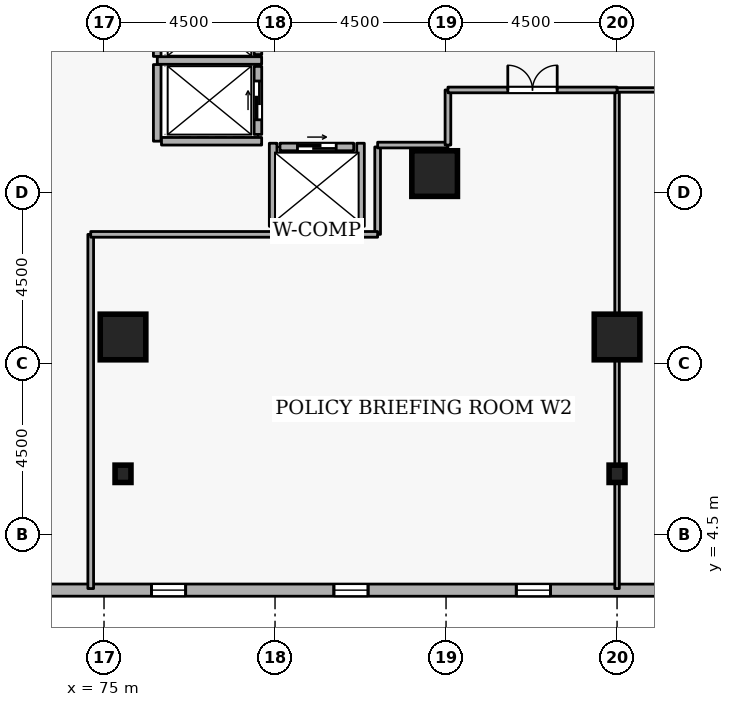
"""IFC4 building model, lengths in metres.
Left out: names, types, materials, properties, quantities, classifications, styles, units other than length and angle.
Written with IfcOpenShell. Run it as: python <this file> out.ifc"""

import sys

from ifc_helpers import new_model, si_unit, direction, frame, frame_2d, origin, origin_2d, place, context, subcontext, project, spatial, rectangle, i_section, extrude, element, fill, save


model = new_model("IFC4")
c1 = context("Model", 3, precision=1e-05, world=origin(), true_north=direction((0.0, 1.0)))
c2 = subcontext(c1, "Body", "Model", "MODEL_VIEW")
j1 = project(units=[si_unit("LENGTHUNIT", "METRE"), si_unit("PLANEANGLEUNIT", "RADIAN")], contexts=[c1])
p1 = place(None, origin())
s1 = spatial("IfcSite", under=j1, at=p1, CompositionType="ELEMENT")
p2 = place(p1, origin())
s2 = spatial("IfcBuilding", under=s1, at=p2, CompositionType="ELEMENT")
p3 = place(p2, frame((0.0, 0.0, 98.1)))
s3 = spatial("IfcBuildingStorey", under=s2, at=p3, CompositionType="ELEMENT", Elevation=98.1)
for number, where, z_axis, x_axis in (
    (1, (88.5, 9.7, 0.0), (0.0, 0.0, 1.0), (1.0, 0.0, 0.0)),
    (2, (75.5, 9.7, 0.0), (0.0, 0.0, 1.0), (1.0, 0.0, 0.0)),
    (3, (83.7, 14.0, 0.0), (0.0, 0.0, 1.0), (1.0, 0.0, 0.0)),
):
    element("IfcColumn", number, at=place(p3, frame(where, z_axis=z_axis, x_axis=x_axis)), inside=s3, PredefinedType="COLUMN", context=c2, shape_type="SweptSolid", body=[
        extrude(rectangle(XDim=1.2, YDim=1.2, at=origin_2d()), origin(), (0.0, 0.0, 1.0), 3.6),
    ])
for number, where, z_axis, x_axis in (
    (4, (88.5, 6.1, 0.0), (0.0, 0.0, 1.0), (1.0, 0.0, 0.0)),
    (5, (75.5, 6.1, 0.0), (0.0, 0.0, 1.0), (1.0, 0.0, 0.0)),
):
    element("IfcColumn", number, at=place(p3, frame(where, z_axis=z_axis, x_axis=x_axis)), inside=s3, PredefinedType="COLUMN", context=c2, shape_type="SweptSolid", body=[
        extrude(i_section(OverallWidth=0.418, OverallDepth=0.456, WebThickness=0.042, FlangeThickness=0.067, FilletRadius=0.015, at=origin_2d()), origin(), (0.0, 0.0, 1.0), 3.6),
    ])
p4 = place(p3, frame((68.748, 3.041, 0.0), z_axis=(0.0, 0.0, 1.0), x_axis=(0.999999989352, -0.000145929605, 0.0)))
e6 = element("IfcWall", 6, at=p4, inside=s3, PredefinedType="STANDARD", context=c2, shape_type="SweptSolid", body=[
    extrude(rectangle(XDim=35.133, YDim=0.32, at=frame_2d((17.566, 0.0))), origin(), (0.0, 0.0, 1.0), 2.7),
])
p5 = place(p4, frame((2.7, 0.0, 0.72)))
e7 = element("IfcOpeningElement", 7, at=p5, cuts=e6, PredefinedType="OPENING", context=c2, shape_type="SweptSolid", body=[
    extrude(rectangle(XDim=0.9, YDim=1.75, at=frame_2d((0.45, 0.875))), frame((0.0, 0.17, 0.0), z_axis=(0.0, -1.0, 0.0), x_axis=(1.0, 0.0, 0.0)), (0.0, 0.0, 1.0), 0.34),
])
p6 = place(p4, frame((7.5, 0.0, 0.72)))
e8 = element("IfcOpeningElement", 8, at=p6, cuts=e6, PredefinedType="OPENING", context=c2, shape_type="SweptSolid", body=[
    extrude(rectangle(XDim=0.9, YDim=1.75, at=frame_2d((0.45, 0.875))), frame((0.0, 0.17, 0.0), z_axis=(0.0, -1.0, 0.0), x_axis=(1.0, 0.0, 0.0)), (0.0, 0.0, 1.0), 0.34),
])
p7 = place(p4, frame((12.3, 0.0, 0.72)))
e9 = element("IfcOpeningElement", 9, at=p7, cuts=e6, PredefinedType="OPENING", context=c2, shape_type="SweptSolid", body=[
    extrude(rectangle(XDim=0.9, YDim=1.75, at=frame_2d((0.45, 0.875))), frame((0.0, 0.17, 0.0), z_axis=(0.0, -1.0, 0.0), x_axis=(1.0, 0.0, 0.0)), (0.0, 0.0, 1.0), 0.34),
])
p8 = place(p4, frame((17.1, 0.0, 0.72)))
e10 = element("IfcOpeningElement", 10, at=p8, cuts=e6, PredefinedType="OPENING", context=c2, shape_type="SweptSolid", body=[
    extrude(rectangle(XDim=0.9, YDim=1.75, at=frame_2d((0.45, 0.875))), frame((0.0, 0.17, 0.0), z_axis=(0.0, -1.0, 0.0), x_axis=(1.0, 0.0, 0.0)), (0.0, 0.0, 1.0), 0.34),
])
p9 = place(p4, frame((21.9, 0.0, 0.72)))
e11 = element("IfcOpeningElement", 11, at=p9, cuts=e6, PredefinedType="OPENING", context=c2, shape_type="SweptSolid", body=[
    extrude(rectangle(XDim=0.9, YDim=1.75, at=frame_2d((0.45, 0.875))), frame((0.0, 0.17, 0.0), z_axis=(0.0, -1.0, 0.0), x_axis=(1.0, 0.0, 0.0)), (0.0, 0.0, 1.0), 0.34),
])
p10 = place(p4, frame((26.7, 0.0, 0.72)))
e12 = element("IfcOpeningElement", 12, at=p10, cuts=e6, PredefinedType="OPENING", context=c2, shape_type="SweptSolid", body=[
    extrude(rectangle(XDim=0.9, YDim=1.75, at=frame_2d((0.45, 0.875))), frame((0.0, 0.17, 0.0), z_axis=(0.0, -1.0, 0.0), x_axis=(1.0, 0.0, 0.0)), (0.0, 0.0, 1.0), 0.34),
])
p11 = place(p4, frame((31.5, 0.0, 0.72)))
e13 = element("IfcOpeningElement", 13, at=p11, cuts=e6, PredefinedType="OPENING", context=c2, shape_type="SweptSolid", body=[
    extrude(rectangle(XDim=0.9, YDim=1.75, at=frame_2d((0.45, 0.875))), frame((0.0, 0.17, 0.0), z_axis=(0.0, -1.0, 0.0), x_axis=(1.0, 0.0, 0.0)), (0.0, 0.0, 1.0), 0.34),
])
p12 = place(p3, frame((79.05, 17.13, 0.0), z_axis=(0.0, 0.0, 1.0), x_axis=(0.0, 1.0, 0.0)))
e14 = element("IfcWall", 14, at=p12, inside=s3, PredefinedType="STANDARD", context=c2, shape_type="SweptSolid", body=[
    extrude(rectangle(XDim=1.74, YDim=0.2, at=frame_2d((0.87, 0.0))), origin(), (0.0, 0.0, 1.0), 3.3),
])
p13 = place(p12, frame((0.36, 0.0, 0.0)))
e15 = element("IfcOpeningElement", 15, at=p13, cuts=e14, PredefinedType="OPENING", context=c2, shape_type="SweptSolid", body=[
    extrude(rectangle(XDim=1.02, YDim=2.06, at=frame_2d((0.51, 1.03))), frame((0.0, 0.11, 0.0), z_axis=(0.0, -1.0, 0.0), x_axis=(1.0, 0.0, 0.0)), (0.0, 0.0, 1.0), 0.22),
])
p14 = place(p3, frame((79.05, 15.03, 0.0), z_axis=(0.0, 0.0, 1.0), x_axis=(0.0, 1.0, 0.0)))
e16 = element("IfcWall", 16, at=p14, inside=s3, PredefinedType="STANDARD", context=c2, shape_type="SweptSolid", body=[
    extrude(rectangle(XDim=1.79, YDim=0.2, at=frame_2d((0.895, 0.0))), origin(), (0.0, 0.0, 1.0), 3.3),
])
p15 = place(p14, frame((0.385, 0.0, 0.0)))
e17 = element("IfcOpeningElement", 17, at=p15, cuts=e16, PredefinedType="OPENING", context=c2, shape_type="SweptSolid", body=[
    extrude(rectangle(XDim=1.02, YDim=2.06, at=frame_2d((0.51, 1.03))), frame((0.0, 0.11, 0.0), z_axis=(0.0, -1.0, 0.0), x_axis=(1.0, 0.0, 0.0)), (0.0, 0.0, 1.0), 0.22),
])
p16 = place(p3, frame((79.63, 14.7, 0.0), z_axis=(0.0, 0.0, 1.0), x_axis=(1.0, 0.0, 0.0)))
e18 = element("IfcWall", 18, at=p16, inside=s3, PredefinedType="STANDARD", context=c2, shape_type="SweptSolid", body=[
    extrude(rectangle(XDim=1.94, YDim=0.2, at=frame_2d((0.97, 0.0))), origin(), (0.0, 0.0, 1.0), 3.3),
])
p17 = place(p16, frame((0.46, 0.0, 0.0)))
e19 = element("IfcOpeningElement", 19, at=p17, cuts=e18, PredefinedType="OPENING", context=c2, shape_type="SweptSolid", body=[
    extrude(rectangle(XDim=1.02, YDim=2.06, at=frame_2d((0.51, 1.03))), frame((0.0, 0.11, 0.0), z_axis=(0.0, -1.0, 0.0), x_axis=(1.0, 0.0, 0.0)), (0.0, 0.0, 1.0), 0.22),
])
p18 = place(p3, frame((76.402, 16.975, 0.0), z_axis=(0.0, 0.0, 1.0), x_axis=(1.0, 0.0, 0.0)))
e20 = element("IfcWall", 20, at=p18, inside=s3, PredefinedType="STANDARD", context=c2, shape_type="SweptSolid", body=[
    extrude(rectangle(XDim=2.746, YDim=0.2, at=frame_2d((1.373, 0.0))), origin(), (0.0, 0.0, 1.0), 3.3),
])
p19 = place(p3, frame((76.4, 14.852, 0.0), z_axis=(0.0, 0.0, 1.0), x_axis=(0.0, 1.0, 0.0)))
e21 = element("IfcWall", 21, at=p19, inside=s3, PredefinedType="STANDARD", context=c2, shape_type="SweptSolid", body=[
    extrude(rectangle(XDim=2.016, YDim=0.2, at=frame_2d((1.008, 0.0))), origin(), (0.0, 0.0, 1.0), 3.3),
])
p20 = place(p3, frame((76.4, 17.082, 0.0), z_axis=(0.0, 0.0, 1.0), x_axis=(0.0, 1.0, 0.0)))
e22 = element("IfcWall", 22, at=p20, inside=s3, PredefinedType="STANDARD", context=c2, shape_type="SweptSolid", body=[
    extrude(rectangle(XDim=1.856, YDim=0.2, at=frame_2d((0.928, 0.0))), origin(), (0.0, 0.0, 1.0), 3.3),
])
p21 = place(p3, frame((76.512, 14.85, 0.0), z_axis=(0.0, 0.0, 1.0), x_axis=(1.0, 0.0, 0.0)))
e23 = element("IfcWall", 23, at=p21, inside=s3, PredefinedType="STANDARD", context=c2, shape_type="SweptSolid", body=[
    extrude(rectangle(XDim=2.636, YDim=0.2, at=frame_2d((1.318, 0.0))), origin(), (0.0, 0.0, 1.0), 3.3),
])
p22 = place(p3, frame((79.452, 12.5, 0.0), z_axis=(0.0, 0.0, 1.0), x_axis=(1.0, 0.0, 0.0)))
e24 = element("IfcWall", 24, at=p22, inside=s3, PredefinedType="STANDARD", context=c2, shape_type="SweptSolid", body=[
    extrude(rectangle(XDim=2.296, YDim=0.2, at=frame_2d((1.148, 0.0))), origin(), (0.0, 0.0, 1.0), 3.3),
])
for number, where, z_axis, x_axis in (
    (25, (81.75, 12.612, 0.0), (0.0, 0.0, 1.0), (0.0, 1.0, 0.0)),
    (26, (79.45, 12.612, 0.0), (0.0, 0.0, 1.0), (0.0, 1.0, 0.0)),
):
    element("IfcWall", number, at=place(p3, frame(where, z_axis=z_axis, x_axis=x_axis)), inside=s3, PredefinedType="STANDARD", context=c2, shape_type="SweptSolid", body=[
        extrude(rectangle(XDim=2.186, YDim=0.2, at=frame_2d((1.093, 0.0))), origin(), (0.0, 0.0, 1.0), 3.3),
    ])
p23 = place(p3, frame((88.5, 3.08, 0.0), z_axis=(0.0, 0.0, 1.0), x_axis=(0.0, 1.0, 0.0)))
e27 = element("IfcWall", 27, at=p23, inside=s3, PredefinedType="PARTITIONING", context=c2, shape_type="SweptSolid", body=[
    extrude(rectangle(XDim=13.12, YDim=0.12, at=frame_2d((6.56, 0.0))), origin(), (0.0, 0.0, 1.0), 2.838),
])
p24 = place(p3, frame((88.5, 16.2, 0.0), z_axis=(0.0, 0.0, 1.0), x_axis=(1.0, 0.0, 0.0)))
e28 = element("IfcWall", 28, at=p24, inside=s3, PredefinedType="PARTITIONING", context=c2, shape_type="SweptSolid", body=[
    extrude(rectangle(XDim=4.45, YDim=0.12, at=frame_2d((2.225, 0.0))), origin(), (0.0, 0.0, 1.0), 3.3),
])
p25 = place(p24, frame((1.7, 0.0, 0.0)))
e29 = element("IfcOpeningElement", 29, at=p25, cuts=e28, PredefinedType="OPENING", context=c2, shape_type="SweptSolid", body=[
    extrude(rectangle(XDim=1.05, YDim=2.1, at=frame_2d((0.525, 1.05))), frame((0.0, 0.07, 0.0), z_axis=(0.0, -1.0, 0.0), x_axis=(1.0, 0.0, 0.0)), (0.0, 0.0, 1.0), 0.14),
])
p26 = place(p3, frame((82.2, 12.4, 0.0), z_axis=(0.0, 0.0, 1.0), x_axis=(0.0, 1.0, 0.0)))
e30 = element("IfcWall", 30, at=p26, inside=s3, PredefinedType="PARTITIONING", context=c2, shape_type="SweptSolid", body=[
    extrude(rectangle(XDim=2.3, YDim=0.15, at=frame_2d((1.15, 0.0))), origin(), (0.0, 0.0, 1.0), 3.3),
])
p27 = place(p3, frame((82.2, 14.75, 0.0), z_axis=(0.0, 0.0, 1.0), x_axis=(1.0, 0.0, 0.0)))
e31 = element("IfcWall", 31, at=p27, inside=s3, PredefinedType="PARTITIONING", context=c2, shape_type="SweptSolid", body=[
    extrude(rectangle(XDim=1.85, YDim=0.15, at=frame_2d((0.925, 0.0))), origin(), (0.0, 0.0, 1.0), 3.3),
])
p28 = place(p3, frame((84.05, 14.75, 0.0), z_axis=(0.0, 0.0, 1.0), x_axis=(0.0, 1.0, 0.0)))
e32 = element("IfcWall", 32, at=p28, inside=s3, PredefinedType="PARTITIONING", context=c2, shape_type="SweptSolid", body=[
    extrude(rectangle(XDim=1.45, YDim=0.15, at=frame_2d((0.725, 0.0))), origin(), (0.0, 0.0, 1.0), 3.3),
])
p29 = place(p3, frame((84.05, 16.2, 0.0), z_axis=(0.0, 0.0, 1.0), x_axis=(1.0, 0.0, 0.0)))
e33 = element("IfcWall", 33, at=p29, inside=s3, PredefinedType="PARTITIONING", context=c2, shape_type="SweptSolid", body=[
    extrude(rectangle(XDim=4.45, YDim=0.15, at=frame_2d((2.225, 0.0))), origin(), (0.0, 0.0, 1.0), 3.3),
])
p30 = place(p29, frame((1.575, 0.0, 0.0)))
e34 = element("IfcOpeningElement", 34, at=p30, cuts=e33, PredefinedType="OPENING", context=c2, shape_type="SweptSolid", body=[
    extrude(rectangle(XDim=1.3, YDim=2.12, at=frame_2d((0.65, 1.06))), frame((0.0, 0.085, 0.0), z_axis=(0.0, -1.0, 0.0), x_axis=(1.0, 0.0, 0.0)), (0.0, 0.0, 1.0), 0.17),
])
p31 = place(p3, frame((74.65, 3.08, 0.0), z_axis=(0.0, 0.0, 1.0), x_axis=(0.0, 1.0, 0.0)))
e35 = element("IfcWall", 35, at=p31, inside=s3, PredefinedType="PARTITIONING", context=c2, shape_type="SweptSolid", body=[
    extrude(rectangle(XDim=9.32, YDim=0.15, at=frame_2d((4.66, 0.0))), origin(), (0.0, 0.0, 1.0), 3.3),
])
p32 = place(p3, frame((74.65, 12.4, 0.0), z_axis=(0.0, 0.0, 1.0), x_axis=(1.0, 0.0, 0.0)))
e36 = element("IfcWall", 36, at=p32, inside=s3, PredefinedType="PARTITIONING", context=c2, shape_type="SweptSolid", body=[
    extrude(rectangle(XDim=4.802, YDim=0.15, at=frame_2d((2.401, 0.0))), origin(), (0.0, 0.0, 1.0), 3.3),
])
p33 = place(p3, frame((81.748, 12.4, 0.0), z_axis=(0.0, 0.0, 1.0), x_axis=(1.0, 0.0, 0.0)))
e37 = element("IfcWall", 37, at=p33, inside=s3, PredefinedType="PARTITIONING", context=c2, shape_type="SweptSolid", body=[
    extrude(rectangle(XDim=0.452, YDim=0.15, at=frame_2d((0.226, 0.0))), origin(), (0.0, 0.0, 1.0), 3.3),
])
p34 = place(p6, origin())
e38 = element("IfcWindow", 38, at=p34, inside=s3, PartitioningType="SINGLE_PANEL", PredefinedType="WINDOW", context=c2, shape_type="SweptSolid", body=[
    extrude(rectangle(XDim=0.9, YDim=1.75, at=frame_2d((0.45, 0.875))), frame((0.0, 0.03, 0.0), z_axis=(0.0, -1.0, 0.0), x_axis=(1.0, 0.0, 0.0)), (0.0, 0.0, 1.0), 0.06),
])
fill(e8, e38)
p35 = place(p7, origin())
e39 = element("IfcWindow", 39, at=p35, inside=s3, PartitioningType="SINGLE_PANEL", PredefinedType="WINDOW", context=c2, shape_type="SweptSolid", body=[
    extrude(rectangle(XDim=0.9, YDim=1.75, at=frame_2d((0.45, 0.875))), frame((0.0, 0.03, 0.0), z_axis=(0.0, -1.0, 0.0), x_axis=(1.0, 0.0, 0.0)), (0.0, 0.0, 1.0), 0.06),
])
fill(e9, e39)
p36 = place(p8, origin())
e40 = element("IfcWindow", 40, at=p36, inside=s3, PartitioningType="SINGLE_PANEL", PredefinedType="WINDOW", context=c2, shape_type="SweptSolid", body=[
    extrude(rectangle(XDim=0.9, YDim=1.75, at=frame_2d((0.45, 0.875))), frame((0.0, 0.03, 0.0), z_axis=(0.0, -1.0, 0.0), x_axis=(1.0, 0.0, 0.0)), (0.0, 0.0, 1.0), 0.06),
])
fill(e10, e40)
p37 = place(p15, origin())
e41 = element("IfcDoor", 41, at=p37, inside=s3, OperationType="SLIDING_TO_LEFT", PredefinedType="DOOR", context=c2, shape_type="SweptSolid", body=[
    extrude(rectangle(XDim=1.02, YDim=2.06, at=frame_2d((0.51, 1.03))), frame((0.0, 0.025, 0.0), z_axis=(0.0, -1.0, 0.0), x_axis=(1.0, 0.0, 0.0)), (0.0, 0.0, 1.0), 0.05),
])
fill(e17, e41)
p38 = place(p17, origin())
e42 = element("IfcDoor", 42, at=p38, inside=s3, OperationType="SLIDING_TO_LEFT", PredefinedType="DOOR", context=c2, shape_type="SweptSolid", body=[
    extrude(rectangle(XDim=1.02, YDim=2.06, at=frame_2d((0.51, 1.03))), frame((0.0, 0.025, 0.0), z_axis=(0.0, -1.0, 0.0), x_axis=(1.0, 0.0, 0.0)), (0.0, 0.0, 1.0), 0.05),
])
fill(e19, e42)
p39 = place(p30, origin())
e43 = element("IfcDoor", 43, at=p39, inside=s3, OperationType="DOUBLE_DOOR_SINGLE_SWING", PredefinedType="DOOR", context=c2, shape_type="SweptSolid", body=[
    extrude(rectangle(XDim=1.3, YDim=2.12, at=frame_2d((0.65, 1.06))), frame((0.0, 0.025, 0.0), z_axis=(0.0, -1.0, 0.0), x_axis=(1.0, 0.0, 0.0)), (0.0, 0.0, 1.0), 0.05),
])
fill(e34, e43)
save(model, sys.argv[1])
